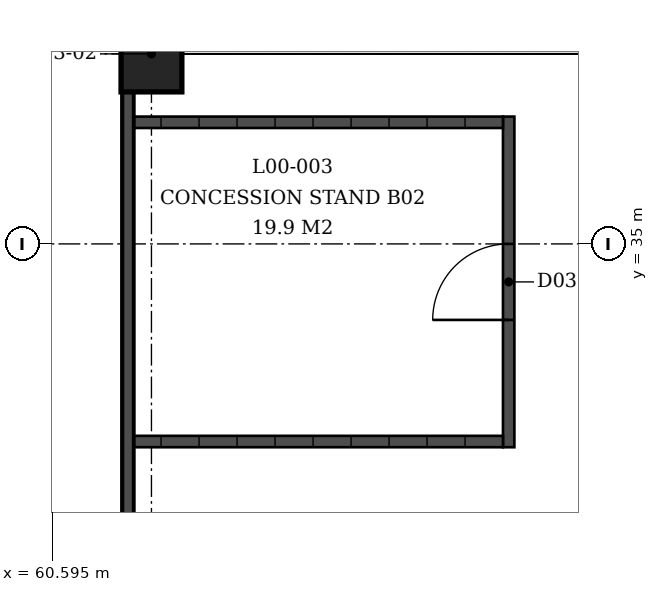
"""IFC4 building model, lengths in metres.
Left out: names, types, materials, properties, quantities, classifications, styles, units other than length and angle.
Written with IfcOpenShell. Run it as: python <this file> out.ifc"""

import sys

from ifc_helpers import new_model, si_unit, direction, frame, frame_2d, origin, origin_2d, place, context, subcontext, project, spatial, rectangle, extrude, element, fill, save


model = new_model("IFC4")
c1 = context("Model", 3, precision=1e-05, world=origin(), true_north=direction((0.0, 1.0)))
c2 = subcontext(c1, "Body", "Model", "MODEL_VIEW")
j1 = project(units=[si_unit("LENGTHUNIT", "METRE"), si_unit("PLANEANGLEUNIT", "RADIAN")], contexts=[c1])
p1 = place(None, origin())
s1 = spatial("IfcSite", under=j1, at=p1, CompositionType="ELEMENT")
p2 = place(p1, origin())
s2 = spatial("IfcBuilding", under=s1, at=p2, CompositionType="ELEMENT")
p3 = place(p2, origin())
s3 = spatial("IfcBuildingStorey", under=s2, at=p3, CompositionType="ELEMENT", Elevation=0.0)
p4 = place(p3, frame((61.9, 37.5, 0.0), z_axis=(0.0, 0.0, 1.0), x_axis=(0.0, 1.0, 0.0)))
e1 = element("IfcColumn", 1, at=p4, inside=s3, PredefinedType="COLUMN", context=c2, shape_type="SweptSolid", body=[
    extrude(rectangle(XDim=1.0, YDim=0.8, at=origin_2d()), origin(), (0.0, 0.0, 1.0), 4.5),
])
p5 = place(p3, frame((66.6, 36.675, 0.0), z_axis=(0.0, 0.0, 1.0), x_axis=(0.0, -1.0, 0.0)))
e2 = element("IfcWall", 2, at=p5, inside=s3, PredefinedType="SOLIDWALL", context=c2, shape_type="SweptSolid", body=[
    extrude(rectangle(XDim=4.35, YDim=0.15, at=frame_2d((2.175, 0.0))), origin(), (0.0, 0.0, 1.0), 3.0),
])
p6 = place(p5, frame((1.675, 0.0, 0.0)))
e3 = element("IfcOpeningElement", 3, at=p6, cuts=e2, PredefinedType="OPENING", context=c2, shape_type="SweptSolid", body=[
    extrude(rectangle(XDim=1.0, YDim=2.1, at=frame_2d((0.5, 1.05))), frame((0.0, 0.075, 0.0), z_axis=(0.0, -1.0, 0.0), x_axis=(1.0, 0.0, 0.0)), (0.0, 0.0, 1.0), 0.15),
])
for number, where, z_axis, x_axis in (
    (4, (61.6, 36.6, 0.0), (0.0, 0.0, 1.0), (1.0, 0.0, 0.0)),
    (5, (61.6, 32.4, 0.0), (0.0, 0.0, 1.0), (1.0, 0.0, 0.0)),
):
    element("IfcWall", number, at=place(p3, frame(where, z_axis=z_axis, x_axis=x_axis)), inside=s3, PredefinedType="SOLIDWALL", context=c2, shape_type="SweptSolid", body=[
        extrude(rectangle(XDim=4.925, YDim=0.15, at=frame_2d((2.462, 0.0))), origin(), (0.0, 0.0, 1.0), 3.0),
    ])
p7 = place(p3, frame((61.6, 37.0, 0.0), z_axis=(0.0, 0.0, 1.0), x_axis=(0.0, -1.0, 0.0)))
e6 = element("IfcWall", 6, at=p7, inside=s3, PredefinedType="SOLIDWALL", context=c2, shape_type="SweptSolid", body=[
    extrude(rectangle(XDim=14.1, YDim=0.15, at=frame_2d((7.05, 0.0))), origin(), (0.0, 0.0, 1.0), 3.0),
])
p8 = place(p6, origin())
e7 = element("IfcDoor", 7, at=p8, inside=s3, OperationType="SINGLE_SWING_RIGHT", PredefinedType="DOOR", context=c2, shape_type="SweptSolid", body=[
    extrude(rectangle(XDim=1.0, YDim=2.1, at=frame_2d((0.5, 1.05))), frame((0.0, 0.025, 0.0), z_axis=(0.0, -1.0, 0.0), x_axis=(1.0, 0.0, 0.0)), (0.0, 0.0, 1.0), 0.05),
])
fill(e3, e7)
save(model, sys.argv[1])
